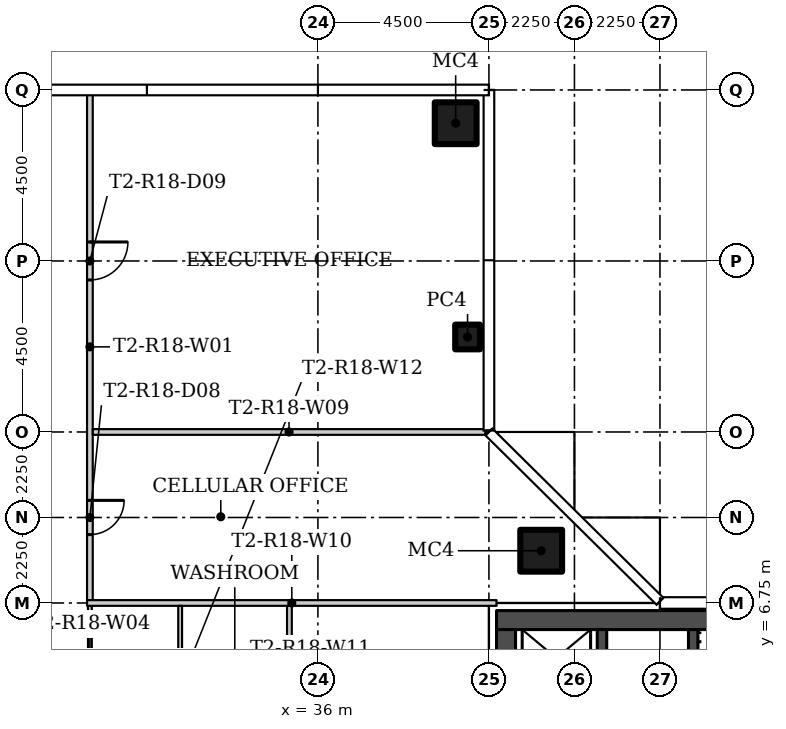
"""IFC4 building model, lengths in metres.
Left out: names, types, materials, properties, quantities, classifications, styles, units other than length and angle.
Written with IfcOpenShell. Run it as: python <this file> out.ifc"""

import sys

from ifc_helpers import new_model, si_unit, direction, frame, frame_2d, origin, origin_2d, place, context, subcontext, project, spatial, rectangle, hollow_rectangle, extrude, element, fill, save


model = new_model("IFC4")
c1 = context("Model", 3, precision=1e-05, world=origin(), true_north=direction((0.0, 1.0)))
c2 = subcontext(c1, "Body", "Model", "MODEL_VIEW")
j1 = project(units=[si_unit("LENGTHUNIT", "METRE"), si_unit("PLANEANGLEUNIT", "RADIAN")], contexts=[c1])
p1 = place(None, origin())
s1 = spatial("IfcSite", under=j1, at=p1, CompositionType="ELEMENT")
p2 = place(p1, origin())
s2 = spatial("IfcBuilding", under=s1, at=p2, CompositionType="ELEMENT")
p3 = place(p2, frame((0.0, 0.0, 162.3)))
s3 = spatial("IfcBuildingStorey", under=s2, at=p3, CompositionType="ELEMENT", Elevation=162.3)
p4 = place(p3, frame((41.875, 8.125, 0.0)))
e1 = element("IfcColumn", 1, at=p4, inside=s3, PredefinedType="COLUMN", context=c2, shape_type="SweptSolid", body=[
    extrude(hollow_rectangle(XDim=1.1, YDim=1.1, WallThickness=0.04, at=origin_2d()), origin(), (0.0, 0.0, 1.0), 3.55),
])
p5 = place(p3, frame((39.938, 13.75, 0.0)))
e2 = element("IfcColumn", 2, at=p5, inside=s3, PredefinedType="COLUMN", context=c2, shape_type="SweptSolid", body=[
    extrude(hollow_rectangle(XDim=0.65, YDim=0.65, WallThickness=0.02, at=origin_2d()), origin(), (0.0, 0.0, 1.0), 3.55),
])
p6 = place(p3, frame((39.625, 19.375, 0.0)))
e3 = element("IfcColumn", 3, at=p6, inside=s3, PredefinedType="COLUMN", context=c2, shape_type="SweptSolid", body=[
    extrude(hollow_rectangle(XDim=1.1, YDim=1.1, WallThickness=0.04, at=origin_2d()), origin(), (0.0, 0.0, 1.0), 3.55),
])
p7 = place(p3, frame((30.0, 20.155, 0.0), z_axis=(0.0, 0.0, 1.0), x_axis=(0.0, -1.0, 0.0)))
e4 = element("IfcWall", 4, at=p7, inside=s3, PredefinedType="PARTITIONING", context=c2, shape_type="SweptSolid", body=[
    extrude(rectangle(XDim=13.33, YDim=0.15, at=frame_2d((6.665, 0.0))), origin(), (0.0, 0.0, 1.0), 3.55),
])
p8 = place(p7, frame((10.705, 0.0, 0.0)))
e5 = element("IfcOpeningElement", 5, at=p8, cuts=e4, PredefinedType="OPENING", context=c2, shape_type="SweptSolid", body=[
    extrude(rectangle(XDim=0.9, YDim=2.1, at=frame_2d((0.45, 1.05))), frame((0.0, 0.085, 0.0), z_axis=(0.0, -1.0, 0.0), x_axis=(1.0, 0.0, 0.0)), (0.0, 0.0, 1.0), 0.17),
])
p9 = place(p7, frame((3.905, 0.0, 0.0)))
e6 = element("IfcOpeningElement", 6, at=p9, cuts=e4, PredefinedType="OPENING", context=c2, shape_type="SweptSolid", body=[
    extrude(rectangle(XDim=1.0, YDim=2.4, at=frame_2d((0.5, 1.2))), frame((0.0, 0.085, 0.0), z_axis=(0.0, -1.0, 0.0), x_axis=(1.0, 0.0, 0.0)), (0.0, 0.0, 1.0), 0.17),
])
p10 = place(p3, frame((30.0, 6.675, 0.0), z_axis=(0.0, 0.0, 1.0), x_axis=(0.0, -1.0, 0.0)))
e7 = element("IfcWall", 7, at=p10, inside=s3, PredefinedType="PARTITIONING", context=c2, shape_type="SweptSolid", body=[
    extrude(rectangle(XDim=4.175, YDim=0.1, at=frame_2d((2.087, 0.0))), origin(), (0.0, 0.0, 1.0), 3.55),
])
p11 = place(p3, frame((40.405, 11.25, 0.0), z_axis=(0.0, 0.0, 1.0), x_axis=(-1.0, 0.0, 0.0)))
e8 = element("IfcWall", 8, at=p11, inside=s3, PredefinedType="PARTITIONING", context=c2, shape_type="SweptSolid", body=[
    extrude(rectangle(XDim=10.33, YDim=0.15, at=frame_2d((5.165, 0.0))), origin(), (0.0, 0.0, 1.0), 3.55),
])
p12 = place(p3, frame((29.925, 6.75, 0.0)))
e9 = element("IfcWall", 9, at=p12, inside=s3, PredefinedType="PARTITIONING", context=c2, shape_type="SweptSolid", body=[
    extrude(rectangle(XDim=10.775, YDim=0.15, at=frame_2d((5.387, 0.0))), origin(), (0.0, 0.0, 1.0), 3.55),
])
p13 = place(p3, frame((35.25, 6.675, 0.0), z_axis=(0.0, 0.0, 1.0), x_axis=(0.0, -1.0, 0.0)))
e10 = element("IfcWall", 10, at=p13, inside=s3, PredefinedType="PARTITIONING", context=c2, shape_type="SweptSolid", body=[
    extrude(rectangle(XDim=4.162, YDim=0.125, at=frame_2d((2.081, 0.0))), origin(), (0.0, 0.0, 1.0), 3.55),
])
p14 = place(p3, frame((32.375, 6.675, 0.0), z_axis=(0.0, 0.0, 1.0), x_axis=(0.0, -1.0, 0.0)))
e11 = element("IfcWall", 11, at=p14, inside=s3, PredefinedType="PARTITIONING", context=c2, shape_type="SweptSolid", body=[
    extrude(rectangle(XDim=4.175, YDim=0.1, at=frame_2d((2.087, 0.0))), origin(), (0.0, 0.0, 1.0), 3.55),
])
p15 = place(p3, frame((53.8, 6.3, 0.0), z_axis=(0.0, 0.0, 1.0), x_axis=(-1.0, 0.0, 0.0)))
e12 = element("IfcWall", 12, at=p15, inside=s3, PredefinedType="SHEAR", context=c2, shape_type="SweptSolid", body=[
    extrude(rectangle(XDim=13.1, YDim=0.5, at=frame_2d((6.55, 0.0))), origin(), (0.0, 0.0, 1.0), 3.55),
])
p16 = place(p3, frame((40.95, -6.05, 0.0), z_axis=(0.0, 0.0, 1.0), x_axis=(0.0, 1.0, 0.0)))
e13 = element("IfcWall", 13, at=p16, inside=s3, PredefinedType="SHEAR", context=c2, shape_type="SweptSolid", body=[
    extrude(rectangle(XDim=12.1, YDim=0.5, at=frame_2d((6.05, 0.0))), origin(), (0.0, 0.0, 1.0), 3.55),
])
p17 = place(p16, frame((0.8, 0.0, 0.0)))
e14 = element("IfcOpeningElement", 14, at=p17, cuts=e13, PredefinedType="OPENING", context=c2, shape_type="SweptSolid", body=[
    extrude(rectangle(XDim=1.2, YDim=2.1, at=frame_2d((0.6, 1.05))), frame((0.0, 0.26, 0.0), z_axis=(0.0, -1.0, 0.0), x_axis=(1.0, 0.0, 0.0)), (0.0, 0.0, 1.0), 0.52),
])
p18 = place(p16, frame((6.4, 0.0, 0.0)))
e15 = element("IfcOpeningElement", 15, at=p18, cuts=e13, PredefinedType="OPENING", context=c2, shape_type="SweptSolid", body=[
    extrude(rectangle(XDim=1.8, YDim=2.4, at=frame_2d((0.9, 1.2))), frame((0.0, 0.26, 0.0), z_axis=(0.0, -1.0, 0.0), x_axis=(1.0, 0.0, 0.0)), (0.0, 0.0, 1.0), 0.52),
])
for number, where, z_axis, x_axis in (
    (16, (45.875, 3.25, 0.0), (0.0, 0.0, 1.0), (0.0, 1.0, 0.0)),
    (17, (43.475, 3.25, 0.0), (0.0, 0.0, 1.0), (0.0, 1.0, 0.0)),
):
    element("IfcWall", number, at=place(p3, frame(where, z_axis=z_axis, x_axis=x_axis)), inside=s3, PredefinedType="SHEAR", context=c2, shape_type="SweptSolid", body=[
        extrude(rectangle(XDim=2.8, YDim=0.25, at=frame_2d((1.4, 0.0))), origin(), (0.0, 0.0, 1.0), 3.55),
    ])
p19 = place(p8, origin())
e18 = element("IfcDoor", 18, at=p19, inside=s3, OperationType="SINGLE_SWING_LEFT", PredefinedType="DOOR", context=c2, shape_type="SweptSolid", body=[
    extrude(rectangle(XDim=0.9, YDim=2.1, at=frame_2d((0.45, 1.05))), frame((0.0, 0.025, 0.0), z_axis=(0.0, -1.0, 0.0), x_axis=(1.0, 0.0, 0.0)), (0.0, 0.0, 1.0), 0.05),
])
fill(e5, e18)
p20 = place(p9, origin())
e19 = element("IfcDoor", 19, at=p20, inside=s3, OperationType="SINGLE_SWING_RIGHT", PredefinedType="DOOR", context=c2, shape_type="SweptSolid", body=[
    extrude(rectangle(XDim=1.0, YDim=2.4, at=frame_2d((0.5, 1.2))), frame((0.0, 0.025, 0.0), z_axis=(0.0, -1.0, 0.0), x_axis=(1.0, 0.0, 0.0)), (0.0, 0.0, 1.0), 0.05),
])
fill(e6, e19)
save(model, sys.argv[1])
